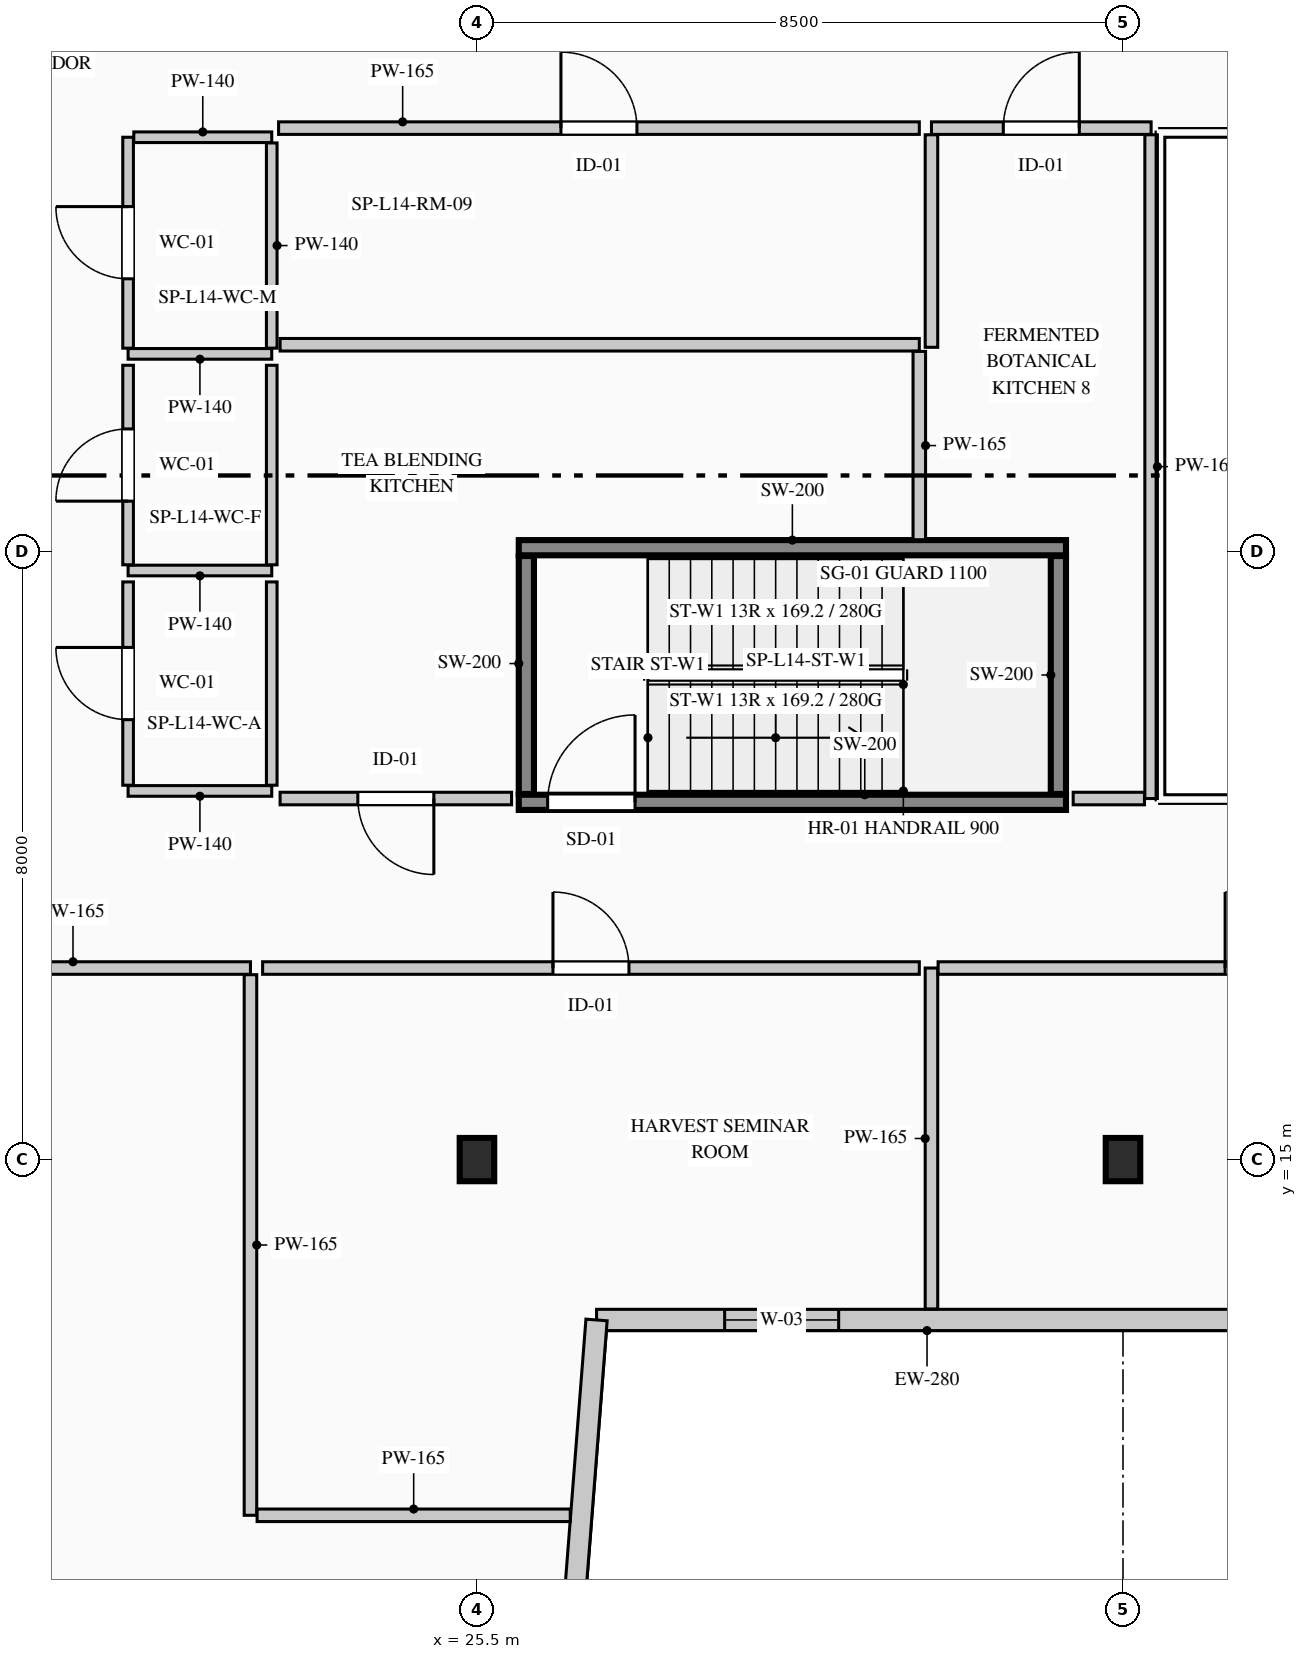
"""IFC4 building model, lengths in metres.
Left out: names, types, materials, properties, quantities, classifications, styles, units other than length and angle.
Written with IfcOpenShell. Run it as: python <this file> out.ifc"""

import sys

from ifc_helpers import new_model, si_unit, direction, frame, frame_2d, origin, origin_2d, place, context, subcontext, project, spatial, rectangle, i_section, extrude, element, fill, save


model = new_model("IFC4")
c1 = context("Model", 3, precision=1e-05, world=origin(), true_north=direction((0.0, 1.0)))
c2 = subcontext(c1, "Body", "Model", "MODEL_VIEW")
j1 = project(units=[si_unit("LENGTHUNIT", "METRE"), si_unit("PLANEANGLEUNIT", "RADIAN")], contexts=[c1])
p1 = place(None, origin())
s1 = spatial("IfcSite", under=j1, at=p1, CompositionType="ELEMENT")
p2 = place(p1, origin())
s2 = spatial("IfcBuilding", under=s1, at=p2, CompositionType="ELEMENT")
p3 = place(p2, frame((0.0, 0.0, 62.2)))
s3 = spatial("IfcBuildingStorey", under=s2, at=p3, CompositionType="ELEMENT", Elevation=62.2)
p4 = place(p3, frame((26.05, 19.7, 0.0), z_axis=(0.0, 0.0, 1.0), x_axis=(1.0, 0.0, 0.0)))
e1 = element("IfcWall", 1, at=p4, inside=s3, PredefinedType="SHEAR", context=c2, shape_type="SweptSolid", body=[
    extrude(rectangle(XDim=7.2, YDim=0.2, at=frame_2d((3.6, 0.0))), origin(), (0.0, 0.0, 1.0), 4.4),
])
p5 = place(p4, frame((0.38, 0.0, 0.0)))
e2 = element("IfcOpeningElement", 2, at=p5, cuts=e1, PredefinedType="OPENING", context=c2, shape_type="SweptSolid", body=[
    extrude(rectangle(XDim=1.15, YDim=2.2, at=frame_2d((0.575, 1.1))), frame((0.0, 0.11, 0.0), z_axis=(0.0, -1.0, 0.0), x_axis=(1.0, 0.0, 0.0)), (0.0, 0.0, 1.0), 0.22),
])
p6 = place(p3, frame((26.05, 23.05, 0.0), z_axis=(0.0, 0.0, 1.0), x_axis=(1.0, 0.0, 0.0)))
e3 = element("IfcWall", 3, at=p6, inside=s3, PredefinedType="SHEAR", context=c2, shape_type="SweptSolid", body=[
    extrude(rectangle(XDim=7.2, YDim=0.2, at=frame_2d((3.6, 0.0))), origin(), (0.0, 0.0, 1.0), 4.4),
])
for number, where, z_axis, x_axis in (
    (4, (26.15, 19.81, 0.0), (0.0, 0.0, 1.0), (0.0, 1.0, 0.0)),
    (5, (33.15, 19.81, 0.0), (0.0, 0.0, 1.0), (0.0, 1.0, 0.0)),
):
    element("IfcWall", number, at=place(p3, frame(where, z_axis=z_axis, x_axis=x_axis)), inside=s3, PredefinedType="SHEAR", context=c2, shape_type="SweptSolid", body=[
        extrude(rectangle(XDim=3.13, YDim=0.2, at=frame_2d((1.565, 0.0))), origin(), (0.0, 0.0, 1.0), 4.4),
    ])
for number, where, z_axis, x_axis in (
    (6, (25.5, 15.0, 0.0), (0.0, 0.0, 1.0), (1.0, 0.0, 0.0)),
    (7, (34.0, 15.0, 0.0), (0.0, 0.0, 1.0), (1.0, 0.0, 0.0)),
):
    element("IfcColumn", number, at=place(p3, frame(where, z_axis=z_axis, x_axis=x_axis)), inside=s3, PredefinedType="COLUMN", context=c2, shape_type="SweptSolid", body=[
        extrude(i_section(OverallWidth=0.454, OverallDepth=0.569, WebThickness=0.078, FlangeThickness=0.08, FilletRadius=0.015, at=origin_2d()), origin(), (0.0, 0.0, 1.0), 4.4),
    ])
p7 = place(p3, frame((35.77, 12.89, 0.0), z_axis=(0.0, 0.0, 1.0), x_axis=(-1.0, 0.0, 0.0)))
e8 = element("IfcWall", 8, at=p7, inside=s3, PredefinedType="STANDARD", context=c2, shape_type="SweptSolid", body=[
    extrude(rectangle(XDim=8.697, YDim=0.28, at=frame_2d((4.348, 0.0))), origin(), (0.0, 0.0, 1.0), 4.1),
])
p8 = place(p7, frame((5.511, 0.0, 0.9)))
e9 = element("IfcOpeningElement", 9, at=p8, cuts=e8, PredefinedType="OPENING", context=c2, shape_type="SweptSolid", body=[
    extrude(rectangle(XDim=1.5, YDim=1.8, at=frame_2d((0.75, 0.9))), frame((0.0, 0.15, 0.0), z_axis=(0.0, -1.0, 0.0), x_axis=(1.0, 0.0, 0.0)), (0.0, 0.0, 1.0), 0.3),
])
p9 = place(p3, frame((27.073, 12.89, 0.0), z_axis=(0.0, 0.0, 1.0), x_axis=(-0.077816860153, -0.996967670627, 0.0)))
e10 = element("IfcWall", 10, at=p9, inside=s3, PredefinedType="STANDARD", context=c2, shape_type="SweptSolid", body=[
    extrude(rectangle(XDim=10.281, YDim=0.28, at=frame_2d((5.141, 0.0))), origin(), (0.0, 0.0, 1.0), 4.1),
])
p10 = place(p3, frame((22.8, 25.6, 0.0), z_axis=(0.0, 0.0, 1.0), x_axis=(-1.0, 0.0, 0.0)))
e11 = element("IfcWall", 11, at=p10, inside=s3, PredefinedType="PARTITIONING", context=c2, shape_type="SweptSolid", body=[
    extrude(rectangle(XDim=1.89, YDim=0.14, at=frame_2d((0.945, 0.0))), origin(), (0.0, 0.0, 1.0), 4.1),
])
p11 = place(p3, frame((20.91, 25.675, 0.0), z_axis=(0.0, 0.0, 1.0), x_axis=(0.0, 1.0, 0.0)))
e12 = element("IfcWall", 12, at=p11, inside=s3, PredefinedType="PARTITIONING", context=c2, shape_type="SweptSolid", body=[
    extrude(rectangle(XDim=2.775, YDim=0.14, at=frame_2d((1.387, 0.0))), origin(), (0.0, 0.0, 1.0), 4.1),
])
p12 = place(p11, frame((0.913, 0.0, 0.0)))
e13 = element("IfcOpeningElement", 13, at=p12, cuts=e12, PredefinedType="OPENING", context=c2, shape_type="SweptSolid", body=[
    extrude(rectangle(XDim=0.95, YDim=2.15, at=frame_2d((0.475, 1.075))), frame((0.0, 0.08, 0.0), z_axis=(0.0, -1.0, 0.0), x_axis=(1.0, 0.0, 0.0)), (0.0, 0.0, 1.0), 0.16),
])
p13 = place(p3, frame((20.985, 28.45, 0.0), z_axis=(0.0, 0.0, 1.0), x_axis=(1.0, 0.0, 0.0)))
e14 = element("IfcWall", 14, at=p13, inside=s3, PredefinedType="PARTITIONING", context=c2, shape_type="SweptSolid", body=[
    extrude(rectangle(XDim=1.815, YDim=0.14, at=frame_2d((0.907, 0.0))), origin(), (0.0, 0.0, 1.0), 4.1),
])
p14 = place(p3, frame((22.8, 28.375, 0.0), z_axis=(0.0, 0.0, 1.0), x_axis=(0.0, -1.0, 0.0)))
e15 = element("IfcWall", 15, at=p14, inside=s3, PredefinedType="PARTITIONING", context=c2, shape_type="SweptSolid", body=[
    extrude(rectangle(XDim=2.7, YDim=0.14, at=frame_2d((1.35, 0.0))), origin(), (0.0, 0.0, 1.0), 3.685),
])
p15 = place(p3, frame((22.8, 22.75, 0.0), z_axis=(0.0, 0.0, 1.0), x_axis=(-1.0, 0.0, 0.0)))
e16 = element("IfcWall", 16, at=p15, inside=s3, PredefinedType="PARTITIONING", context=c2, shape_type="SweptSolid", body=[
    extrude(rectangle(XDim=1.89, YDim=0.14, at=frame_2d((0.945, 0.0))), origin(), (0.0, 0.0, 1.0), 4.1),
])
p16 = place(p3, frame((20.91, 22.825, 0.0), z_axis=(0.0, 0.0, 1.0), x_axis=(0.0, 1.0, 0.0)))
e17 = element("IfcWall", 17, at=p16, inside=s3, PredefinedType="PARTITIONING", context=c2, shape_type="SweptSolid", body=[
    extrude(rectangle(XDim=2.625, YDim=0.14, at=frame_2d((1.312, 0.0))), origin(), (0.0, 0.0, 1.0), 4.1),
])
p17 = place(p16, frame((0.837, 0.0, 0.0)))
e18 = element("IfcOpeningElement", 18, at=p17, cuts=e17, PredefinedType="OPENING", context=c2, shape_type="SweptSolid", body=[
    extrude(rectangle(XDim=0.95, YDim=2.15, at=frame_2d((0.475, 1.075))), frame((0.0, 0.08, 0.0), z_axis=(0.0, -1.0, 0.0), x_axis=(1.0, 0.0, 0.0)), (0.0, 0.0, 1.0), 0.16),
])
p18 = place(p3, frame((22.8, 25.45, 0.0), z_axis=(0.0, 0.0, 1.0), x_axis=(0.0, -1.0, 0.0)))
e19 = element("IfcWall", 19, at=p18, inside=s3, PredefinedType="PARTITIONING", context=c2, shape_type="SweptSolid", body=[
    extrude(rectangle(XDim=2.625, YDim=0.14, at=frame_2d((1.312, 0.0))), origin(), (0.0, 0.0, 1.0), 3.685),
])
p19 = place(p3, frame((22.8, 19.85, 0.0), z_axis=(0.0, 0.0, 1.0), x_axis=(-1.0, 0.0, 0.0)))
e20 = element("IfcWall", 20, at=p19, inside=s3, PredefinedType="PARTITIONING", context=c2, shape_type="SweptSolid", body=[
    extrude(rectangle(XDim=1.89, YDim=0.14, at=frame_2d((0.945, 0.0))), origin(), (0.0, 0.0, 1.0), 4.1),
])
p20 = place(p3, frame((20.91, 19.925, 0.0), z_axis=(0.0, 0.0, 1.0), x_axis=(0.0, 1.0, 0.0)))
e21 = element("IfcWall", 21, at=p20, inside=s3, PredefinedType="PARTITIONING", context=c2, shape_type="SweptSolid", body=[
    extrude(rectangle(XDim=2.675, YDim=0.14, at=frame_2d((1.337, 0.0))), origin(), (0.0, 0.0, 1.0), 4.1),
])
p21 = place(p20, frame((0.863, 0.0, 0.0)))
e22 = element("IfcOpeningElement", 22, at=p21, cuts=e21, PredefinedType="OPENING", context=c2, shape_type="SweptSolid", body=[
    extrude(rectangle(XDim=0.95, YDim=2.15, at=frame_2d((0.475, 1.075))), frame((0.0, 0.08, 0.0), z_axis=(0.0, -1.0, 0.0), x_axis=(1.0, 0.0, 0.0)), (0.0, 0.0, 1.0), 0.16),
])
p22 = place(p3, frame((22.8, 22.6, 0.0), z_axis=(0.0, 0.0, 1.0), x_axis=(0.0, -1.0, 0.0)))
e23 = element("IfcWall", 23, at=p22, inside=s3, PredefinedType="PARTITIONING", context=c2, shape_type="SweptSolid", body=[
    extrude(rectangle(XDim=2.675, YDim=0.14, at=frame_2d((1.337, 0.0))), origin(), (0.0, 0.0, 1.0), 3.685),
])
p23 = place(p3, frame((11.28, 17.52, 0.0), z_axis=(0.0, 0.0, 1.0), x_axis=(1.0, 0.0, 0.0)))
e24 = element("IfcWall", 24, at=p23, inside=s3, PredefinedType="PARTITIONING", context=c2, shape_type="SweptSolid", body=[
    extrude(rectangle(XDim=11.24, YDim=0.165, at=frame_2d((5.62, 0.0))), origin(), (0.0, 0.0, 1.0), 4.1),
])
p24 = place(p23, frame((5.12, 0.0, 0.0)))
e25 = element("IfcOpeningElement", 25, at=p24, cuts=e24, PredefinedType="OPENING", context=c2, shape_type="SweptSolid", body=[
    extrude(rectangle(XDim=1.0, YDim=2.15, at=frame_2d((0.5, 1.075))), frame((0.0, 0.093, 0.0), z_axis=(0.0, -1.0, 0.0), x_axis=(1.0, 0.0, 0.0)), (0.0, 0.0, 1.0), 0.185),
])
p25 = place(p3, frame((22.52, 17.433, 0.0), z_axis=(0.0, 0.0, 1.0), x_axis=(0.0, -1.0, 0.0)))
e26 = element("IfcWall", 26, at=p25, inside=s3, PredefinedType="PARTITIONING", context=c2, shape_type="SweptSolid", body=[
    extrude(rectangle(XDim=7.113, YDim=0.165, at=frame_2d((3.556, 0.0))), origin(), (0.0, 0.0, 1.0), 3.685),
])
p26 = place(p3, frame((22.607, 10.32, 0.0), z_axis=(0.0, 0.0, 1.0), x_axis=(1.0, 0.0, 0.0)))
e27 = element("IfcWall", 27, at=p26, inside=s3, PredefinedType="PARTITIONING", context=c2, shape_type="SweptSolid", body=[
    extrude(rectangle(XDim=4.12, YDim=0.165, at=frame_2d((2.06, 0.0))), origin(), (0.0, 0.0, 1.0), 4.1),
])
p27 = place(p3, frame((31.48, 13.035, 0.0), z_axis=(0.0, 0.0, 1.0), x_axis=(0.0, 1.0, 0.0)))
e28 = element("IfcWall", 28, at=p27, inside=s3, PredefinedType="PARTITIONING", context=c2, shape_type="SweptSolid", body=[
    extrude(rectangle(XDim=4.485, YDim=0.165, at=frame_2d((2.243, 0.0))), origin(), (0.0, 0.0, 1.0), 4.1),
])
p28 = place(p3, frame((31.567, 17.52, 0.0), z_axis=(0.0, 0.0, 1.0), x_axis=(1.0, 0.0, 0.0)))
e29 = element("IfcWall", 29, at=p28, inside=s3, PredefinedType="PARTITIONING", context=c2, shape_type="SweptSolid", body=[
    extrude(rectangle(XDim=8.553, YDim=0.165, at=frame_2d((4.276, 0.0))), origin(), (0.0, 0.0, 1.0), 3.685),
])
p29 = place(p28, frame((3.776, 0.0, 0.0)))
e30 = element("IfcOpeningElement", 30, at=p29, cuts=e29, PredefinedType="OPENING", context=c2, shape_type="SweptSolid", body=[
    extrude(rectangle(XDim=1.0, YDim=2.15, at=frame_2d((0.5, 1.075))), frame((0.0, 0.093, 0.0), z_axis=(0.0, -1.0, 0.0), x_axis=(1.0, 0.0, 0.0)), (0.0, 0.0, 1.0), 0.185),
])
p30 = place(p3, frame((22.68, 17.52, 0.0), z_axis=(0.0, 0.0, 1.0), x_axis=(1.0, 0.0, 0.0)))
e31 = element("IfcWall", 31, at=p30, inside=s3, PredefinedType="PARTITIONING", context=c2, shape_type="SweptSolid", body=[
    extrude(rectangle(XDim=8.64, YDim=0.165, at=frame_2d((4.32, 0.0))), origin(), (0.0, 0.0, 1.0), 3.685),
])
p31 = place(p30, frame((3.82, 0.0, 0.0)))
e32 = element("IfcOpeningElement", 32, at=p31, cuts=e31, PredefinedType="OPENING", context=c2, shape_type="SweptSolid", body=[
    extrude(rectangle(XDim=1.0, YDim=2.15, at=frame_2d((0.5, 1.075))), frame((0.0, 0.093, 0.0), z_axis=(0.0, -1.0, 0.0), x_axis=(1.0, 0.0, 0.0)), (0.0, 0.0, 1.0), 0.185),
])
p32 = place(p3, frame((25.956, 19.75, 0.0), z_axis=(0.0, 0.0, 1.0), x_axis=(-1.0, 0.0, 0.0)))
e33 = element("IfcWall", 33, at=p32, inside=s3, PredefinedType="PARTITIONING", context=c2, shape_type="SweptSolid", body=[
    extrude(rectangle(XDim=3.046, YDim=0.165, at=frame_2d((1.523, 0.0))), origin(), (0.0, 0.0, 1.0), 4.1),
])
p33 = place(p32, frame((1.023, 0.0, 0.0)))
e34 = element("IfcOpeningElement", 34, at=p33, cuts=e33, PredefinedType="OPENING", context=c2, shape_type="SweptSolid", body=[
    extrude(rectangle(XDim=1.0, YDim=2.15, at=frame_2d((0.5, 1.075))), frame((0.0, 0.093, 0.0), z_axis=(0.0, -1.0, 0.0), x_axis=(1.0, 0.0, 0.0)), (0.0, 0.0, 1.0), 0.185),
])
p34 = place(p3, frame((22.91, 25.72, 0.0), z_axis=(0.0, 0.0, 1.0), x_axis=(1.0, 0.0, 0.0)))
e35 = element("IfcWall", 35, at=p34, inside=s3, PredefinedType="PARTITIONING", context=c2, shape_type="SweptSolid", body=[
    extrude(rectangle(XDim=8.41, YDim=0.165, at=frame_2d((4.205, 0.0))), origin(), (0.0, 0.0, 1.0), 3.685),
])
p35 = place(p3, frame((31.32, 25.633, 0.0), z_axis=(0.0, 0.0, 1.0), x_axis=(0.0, -1.0, 0.0)))
e36 = element("IfcWall", 36, at=p35, inside=s3, PredefinedType="PARTITIONING", context=c2, shape_type="SweptSolid", body=[
    extrude(rectangle(XDim=2.478, YDim=0.165, at=frame_2d((1.239, 0.0))), origin(), (0.0, 0.0, 1.0), 4.1),
])
p36 = place(p3, frame((31.48, 28.57, 0.0), z_axis=(0.0, 0.0, 1.0), x_axis=(1.0, 0.0, 0.0)))
e37 = element("IfcWall", 37, at=p36, inside=s3, PredefinedType="PARTITIONING", context=c2, shape_type="SweptSolid", body=[
    extrude(rectangle(XDim=2.89, YDim=0.165, at=frame_2d((1.445, 0.0))), origin(), (0.0, 0.0, 1.0), 3.685),
])
p37 = place(p36, frame((0.945, 0.0, 0.0)))
e38 = element("IfcOpeningElement", 38, at=p37, cuts=e37, PredefinedType="OPENING", context=c2, shape_type="SweptSolid", body=[
    extrude(rectangle(XDim=1.0, YDim=2.15, at=frame_2d((0.5, 1.075))), frame((0.0, 0.093, 0.0), z_axis=(0.0, -1.0, 0.0), x_axis=(1.0, 0.0, 0.0)), (0.0, 0.0, 1.0), 0.185),
])
p38 = place(p3, frame((34.37, 28.482, 0.0), z_axis=(0.0, 0.0, 1.0), x_axis=(0.0, -1.0, 0.0)))
e39 = element("IfcWall", 39, at=p38, inside=s3, PredefinedType="PARTITIONING", context=c2, shape_type="SweptSolid", body=[
    extrude(rectangle(XDim=8.732, YDim=0.165, at=frame_2d((4.366, 0.0))), origin(), (0.0, 0.0, 1.0), 4.1),
])
p39 = place(p3, frame((34.282, 19.75, 0.0), z_axis=(0.0, 0.0, 1.0), x_axis=(-1.0, 0.0, 0.0)))
e40 = element("IfcWall", 40, at=p39, inside=s3, PredefinedType="PARTITIONING", context=c2, shape_type="SweptSolid", body=[
    extrude(rectangle(XDim=0.938, YDim=0.165, at=frame_2d((0.469, 0.0))), origin(), (0.0, 0.0, 1.0), 4.1),
])
p40 = place(p3, frame((31.48, 25.686, 0.0), z_axis=(0.0, 0.0, 1.0), x_axis=(0.0, 1.0, 0.0)))
e41 = element("IfcWall", 41, at=p40, inside=s3, PredefinedType="PARTITIONING", context=c2, shape_type="SweptSolid", body=[
    extrude(rectangle(XDim=2.796, YDim=0.165, at=frame_2d((1.398, 0.0))), origin(), (0.0, 0.0, 1.0), 4.1),
])
p41 = place(p3, frame((22.89, 28.57, 0.0), z_axis=(0.0, 0.0, 1.0), x_axis=(1.0, 0.0, 0.0)))
e42 = element("IfcWall", 42, at=p41, inside=s3, PredefinedType="PARTITIONING", context=c2, shape_type="SweptSolid", body=[
    extrude(rectangle(XDim=8.43, YDim=0.165, at=frame_2d((4.215, 0.0))), origin(), (0.0, 0.0, 1.0), 3.685),
])
p42 = place(p41, frame((3.715, 0.0, 0.0)))
e43 = element("IfcOpeningElement", 43, at=p42, cuts=e42, PredefinedType="OPENING", context=c2, shape_type="SweptSolid", body=[
    extrude(rectangle(XDim=1.0, YDim=2.15, at=frame_2d((0.5, 1.075))), frame((0.0, 0.093, 0.0), z_axis=(0.0, -1.0, 0.0), x_axis=(1.0, 0.0, 0.0)), (0.0, 0.0, 1.0), 0.185),
])
p43 = place(p8, origin())
e44 = element("IfcWindow", 44, at=p43, inside=s3, PartitioningType="SINGLE_PANEL", PredefinedType="WINDOW", context=c2, shape_type="SweptSolid", body=[
    extrude(rectangle(XDim=1.5, YDim=1.8, at=frame_2d((0.75, 0.9))), frame((0.0, 0.03, 0.0), z_axis=(0.0, -1.0, 0.0), x_axis=(1.0, 0.0, 0.0)), (0.0, 0.0, 1.0), 0.06),
])
fill(e9, e44)
p44 = place(p5, origin())
e45 = element("IfcDoor", 45, at=p44, inside=s3, OperationType="SINGLE_SWING_RIGHT", PredefinedType="DOOR", context=c2, shape_type="SweptSolid", body=[
    extrude(rectangle(XDim=1.15, YDim=2.2, at=frame_2d((0.575, 1.1))), frame((0.0, 0.025, 0.0), z_axis=(0.0, -1.0, 0.0), x_axis=(1.0, 0.0, 0.0)), (0.0, 0.0, 1.0), 0.05),
])
fill(e2, e45)
p45 = place(p12, origin())
e46 = element("IfcDoor", 46, at=p45, inside=s3, OperationType="SINGLE_SWING_RIGHT", PredefinedType="DOOR", context=c2, shape_type="SweptSolid", body=[
    extrude(rectangle(XDim=0.95, YDim=2.15, at=frame_2d((0.475, 1.075))), frame((0.0, 0.025, 0.0), z_axis=(0.0, -1.0, 0.0), x_axis=(1.0, 0.0, 0.0)), (0.0, 0.0, 1.0), 0.05),
])
fill(e13, e46)
p46 = place(p17, origin())
e47 = element("IfcDoor", 47, at=p46, inside=s3, OperationType="SINGLE_SWING_LEFT", PredefinedType="DOOR", context=c2, shape_type="SweptSolid", body=[
    extrude(rectangle(XDim=0.95, YDim=2.15, at=frame_2d((0.475, 1.075))), frame((0.0, 0.025, 0.0), z_axis=(0.0, -1.0, 0.0), x_axis=(1.0, 0.0, 0.0)), (0.0, 0.0, 1.0), 0.05),
])
fill(e18, e47)
p47 = place(p21, origin())
e48 = element("IfcDoor", 48, at=p47, inside=s3, OperationType="SINGLE_SWING_RIGHT", PredefinedType="DOOR", context=c2, shape_type="SweptSolid", body=[
    extrude(rectangle(XDim=0.95, YDim=2.15, at=frame_2d((0.475, 1.075))), frame((0.0, 0.025, 0.0), z_axis=(0.0, -1.0, 0.0), x_axis=(1.0, 0.0, 0.0)), (0.0, 0.0, 1.0), 0.05),
])
fill(e22, e48)
p48 = place(p29, origin())
e49 = element("IfcDoor", 49, at=p48, inside=s3, OperationType="SINGLE_SWING_LEFT", PredefinedType="DOOR", context=c2, shape_type="SweptSolid", body=[
    extrude(rectangle(XDim=1.0, YDim=2.15, at=frame_2d((0.5, 1.075))), frame((0.0, 0.025, 0.0), z_axis=(0.0, -1.0, 0.0), x_axis=(1.0, 0.0, 0.0)), (0.0, 0.0, 1.0), 0.05),
])
fill(e30, e49)
p49 = place(p31, origin())
e50 = element("IfcDoor", 50, at=p49, inside=s3, OperationType="SINGLE_SWING_LEFT", PredefinedType="DOOR", context=c2, shape_type="SweptSolid", body=[
    extrude(rectangle(XDim=1.0, YDim=2.15, at=frame_2d((0.5, 1.075))), frame((0.0, 0.025, 0.0), z_axis=(0.0, -1.0, 0.0), x_axis=(1.0, 0.0, 0.0)), (0.0, 0.0, 1.0), 0.05),
])
fill(e32, e50)
p50 = place(p33, origin())
e51 = element("IfcDoor", 51, at=p50, inside=s3, OperationType="SINGLE_SWING_LEFT", PredefinedType="DOOR", context=c2, shape_type="SweptSolid", body=[
    extrude(rectangle(XDim=1.0, YDim=2.15, at=frame_2d((0.5, 1.075))), frame((0.0, 0.025, 0.0), z_axis=(0.0, -1.0, 0.0), x_axis=(1.0, 0.0, 0.0)), (0.0, 0.0, 1.0), 0.05),
])
fill(e34, e51)
p51 = place(p37, origin())
e52 = element("IfcDoor", 52, at=p51, inside=s3, OperationType="SINGLE_SWING_RIGHT", PredefinedType="DOOR", context=c2, shape_type="SweptSolid", body=[
    extrude(rectangle(XDim=1.0, YDim=2.15, at=frame_2d((0.5, 1.075))), frame((0.0, 0.025, 0.0), z_axis=(0.0, -1.0, 0.0), x_axis=(1.0, 0.0, 0.0)), (0.0, 0.0, 1.0), 0.05),
])
fill(e38, e52)
p52 = place(p42, origin())
e53 = element("IfcDoor", 53, at=p52, inside=s3, OperationType="SINGLE_SWING_LEFT", PredefinedType="DOOR", context=c2, shape_type="SweptSolid", body=[
    extrude(rectangle(XDim=1.0, YDim=2.15, at=frame_2d((0.5, 1.075))), frame((0.0, 0.025, 0.0), z_axis=(0.0, -1.0, 0.0), x_axis=(1.0, 0.0, 0.0)), (0.0, 0.0, 1.0), 0.05),
])
fill(e43, e53)
save(model, sys.argv[1])
